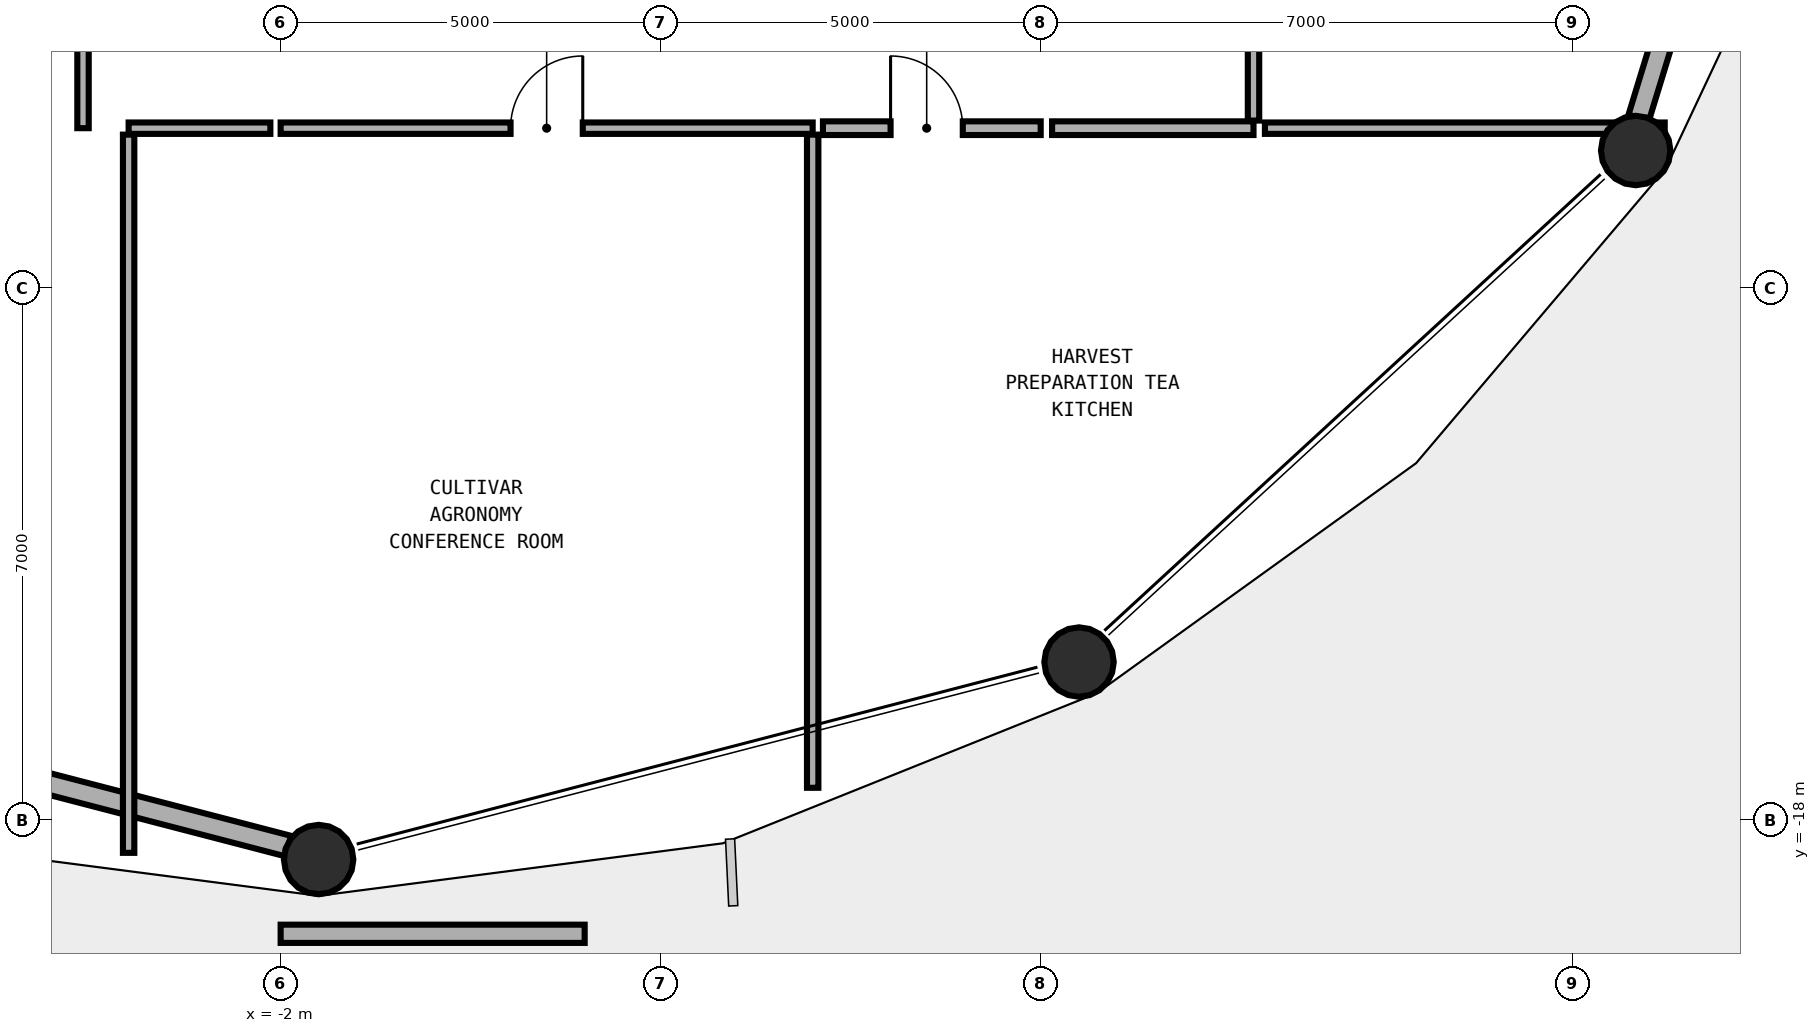
"""IFC4 building model, lengths in metres.
Left out: names, types, materials, properties, quantities, classifications, styles, units other than length and angle.
Written with IfcOpenShell. Run it as: python <this file> out.ifc"""

import sys

from ifc_helpers import new_model, si_unit, direction, frame, frame_2d, origin, origin_2d, place, context, subcontext, project, spatial, rectangle, hollow_circle, extrude, element, fill, save


model = new_model("IFC4")
c1 = context("Model", 3, precision=1e-05, world=origin(), true_north=direction((0.0, 1.0)))
c2 = subcontext(c1, "Body", "Model", "MODEL_VIEW")
j1 = project(units=[si_unit("LENGTHUNIT", "METRE"), si_unit("PLANEANGLEUNIT", "RADIAN")], contexts=[c1])
p1 = place(None, origin())
s1 = spatial("IfcSite", under=j1, at=p1, CompositionType="ELEMENT")
p2 = place(p1, origin())
s2 = spatial("IfcBuilding", under=s1, at=p2, CompositionType="ELEMENT")
p3 = place(p2, frame((0.0, 0.0, 27.6)))
s3 = spatial("IfcBuildingStorey", under=s2, at=p3, CompositionType="ELEMENT", Elevation=27.6)
p4 = place(p3, frame((-1.5, -18.45, 0.0), z_axis=(0.0, -0.037649698668, 0.999290998754), x_axis=(1.0, 0.0, 0.0)))
e1 = element("IfcColumn", 1, at=p4, inside=s3, PredefinedType="COLUMN", context=c2, shape_type="SweptSolid", body=[
    extrude(hollow_circle(Radius=0.457, WallThickness=0.032, at=origin_2d()), origin(), (0.0, 0.0, 1.0), 3.878),
])
p5 = place(p3, frame((8.458, -15.861, 0.0), z_axis=(0.024236523215, -0.032609140326, 0.999174276545), x_axis=(0.802595483818, 0.596523670406, 0.0)))
e2 = element("IfcColumn", 2, at=p5, inside=s3, PredefinedType="COLUMN", context=c2, shape_type="SweptSolid", body=[
    extrude(hollow_circle(Radius=0.457, WallThickness=0.032, at=origin_2d()), origin(), (0.0, 0.0, 1.0), 3.878),
])
p6 = place(p3, frame((15.747, -9.157, 0.0), z_axis=(0.041979196917, -0.018818260687, 0.998941249569), x_axis=(0.409055904093, 0.912509324515, 0.0)))
e3 = element("IfcColumn", 3, at=p6, inside=s3, PredefinedType="COLUMN", context=c2, shape_type="SweptSolid", body=[
    extrude(hollow_circle(Radius=0.457, WallThickness=0.032, at=origin_2d()), origin(), (0.0, 0.0, 1.0), 3.879),
])
p7 = place(p3, frame((-2.0, -19.5, 0.0), z_axis=(0.0, 0.0, 1.0), x_axis=(1.0, 0.0, 0.0)))
e4 = element("IfcWall", 4, at=p7, inside=s3, PredefinedType="PARAPET", context=c2, shape_type="SweptSolid", body=[
    extrude(rectangle(XDim=4.0, YDim=0.24, at=frame_2d((2.0, 0.0))), origin(), (0.0, 0.0, 1.0), 0.55),
])
p8 = place(p3, frame((-1.899, -18.346, 0.0), z_axis=(0.0, 0.0, 1.0), x_axis=(-0.967836325918, 0.251580695274, 0.0)))
e5 = element("IfcWall", 5, at=p8, inside=s3, PredefinedType="SOLIDWALL", context=c2, shape_type="SweptSolid", body=[
    extrude(rectangle(XDim=9.465, YDim=0.28, at=frame_2d((4.732, 0.0))), origin(), (0.0, 0.0, 1.0), 3.06),
])
p9 = place(p3, frame((18.429, -0.394, 0.0), z_axis=(0.0, 0.0, 1.0), x_axis=(-0.292709587844, -0.956201389449, 0.0)))
e6 = element("IfcWall", 6, at=p9, inside=s3, PredefinedType="SOLIDWALL", context=c2, shape_type="SweptSolid", body=[
    extrude(rectangle(XDim=8.753, YDim=0.28, at=frame_2d((4.376, 0.0))), origin(), (0.0, 0.0, 1.0), 3.06),
])
p10 = place(p3, frame((-2.0, -8.9, 0.0), z_axis=(0.0, 0.0, 1.0), x_axis=(1.0, 0.0, 0.0)))
e7 = element("IfcWall", 7, at=p10, inside=s3, PredefinedType="PARTITIONING", context=c2, shape_type="SweptSolid", body=[
    extrude(rectangle(XDim=7.0, YDim=0.15, at=frame_2d((3.5, 0.0))), origin(), (0.0, 0.0, 1.0), 3.64),
])
p11 = place(p10, frame((3.025, 0.0, 0.0)))
e8 = element("IfcOpeningElement", 8, at=p11, cuts=e7, PredefinedType="OPENING", context=c2, shape_type="SweptSolid", body=[
    extrude(rectangle(XDim=0.95, YDim=2.1, at=frame_2d((0.475, 1.05))), frame((0.0, 0.085, 0.0), z_axis=(0.0, -1.0, 0.0), x_axis=(1.0, 0.0, 0.0)), (0.0, 0.0, 1.0), 0.17),
])
p12 = place(p3, frame((5.135, -8.9, 0.0), z_axis=(0.0, 0.0, 1.0), x_axis=(1.0, 0.0, 0.0)))
e9 = element("IfcWall", 9, at=p12, inside=s3, PredefinedType="PLUMBINGWALL", context=c2, shape_type="SweptSolid", body=[
    extrude(rectangle(XDim=2.865, YDim=0.18, at=frame_2d((1.433, 0.0))), origin(), (0.0, 0.0, 1.0), 3.64),
])
p13 = place(p12, frame((0.89, 0.0, 0.0)))
e10 = element("IfcOpeningElement", 10, at=p13, cuts=e9, PredefinedType="OPENING", context=c2, shape_type="SweptSolid", body=[
    extrude(rectangle(XDim=0.95, YDim=2.1, at=frame_2d((0.475, 1.05))), frame((0.0, 0.1, 0.0), z_axis=(0.0, -1.0, 0.0), x_axis=(1.0, 0.0, 0.0)), (0.0, 0.0, 1.0), 0.2),
])
p14 = place(p3, frame((-4.0, -8.9, 0.0), z_axis=(0.0, 0.0, 1.0), x_axis=(1.0, 0.0, 0.0)))
e11 = element("IfcWall", 11, at=p14, inside=s3, PredefinedType="PARTITIONING", context=c2, shape_type="SweptSolid", body=[
    extrude(rectangle(XDim=1.865, YDim=0.15, at=frame_2d((0.933, 0.0))), origin(), (0.0, 0.0, 1.0), 3.64),
])
p15 = place(p3, frame((5.0, -8.985, 0.0), z_axis=(0.0, 0.0, 1.0), x_axis=(0.0, -1.0, 0.0)))
e12 = element("IfcWall", 12, at=p15, inside=s3, PredefinedType="PARTITIONING", context=c2, shape_type="SweptSolid", body=[
    extrude(rectangle(XDim=8.594, YDim=0.15, at=frame_2d((4.297, 0.0))), origin(), (0.0, 0.0, 1.0), 3.64),
])
p16 = place(p3, frame((-4.0, -18.435, 0.0), z_axis=(0.0, 0.0, 1.0), x_axis=(0.0, 1.0, 0.0)))
e13 = element("IfcWall", 13, at=p16, inside=s3, PredefinedType="PARTITIONING", context=c2, shape_type="SweptSolid", body=[
    extrude(rectangle(XDim=9.45, YDim=0.15, at=frame_2d((4.725, 0.0))), origin(), (0.0, 0.0, 1.0), 3.64),
])
p17 = place(p3, frame((8.15, -8.9, 0.0), z_axis=(0.0, 0.0, 1.0), x_axis=(1.0, 0.0, 0.0)))
e14 = element("IfcWall", 14, at=p17, inside=s3, PredefinedType="PLUMBINGWALL", context=c2, shape_type="SweptSolid", body=[
    extrude(rectangle(XDim=2.65, YDim=0.18, at=frame_2d((1.325, 0.0))), origin(), (0.0, 0.0, 1.0), 3.64),
])
p18 = place(p3, frame((10.95, -8.9, 0.0), z_axis=(0.0, 0.0, 1.0), x_axis=(1.0, 0.0, 0.0)))
e15 = element("IfcWall", 15, at=p18, inside=s3, PredefinedType="PARTITIONING", context=c2, shape_type="SweptSolid", body=[
    extrude(rectangle(XDim=5.26, YDim=0.15, at=frame_2d((2.63, 0.0))), origin(), (0.0, 0.0, 1.0), 2.972),
])
p19 = place(p3, frame((-4.6, -6.735, 0.0), z_axis=(0.0, 0.0, 1.0), x_axis=(0.0, -1.0, 0.0)))
e16 = element("IfcWall", 16, at=p19, inside=s3, PredefinedType="PARTITIONING", context=c2, shape_type="SweptSolid", body=[
    extrude(rectangle(XDim=2.165, YDim=0.15, at=frame_2d((1.083, 0.0))), origin(), (0.0, 0.0, 1.0), 3.64),
])
p20 = place(p3, frame((10.8, -8.8, 0.0), z_axis=(0.0, 0.0, 1.0), x_axis=(0.0, 1.0, 0.0)))
e17 = element("IfcWall", 17, at=p20, inside=s3, PredefinedType="PARTITIONING", context=c2, shape_type="SweptSolid", body=[
    extrude(rectangle(XDim=2.2, YDim=0.15, at=frame_2d((1.1, 0.0))), origin(), (0.0, 0.0, 1.0), 3.64),
])
p21 = place(p11, origin())
e18 = element("IfcDoor", 18, at=p21, inside=s3, OperationType="SINGLE_SWING_RIGHT", PredefinedType="DOOR", context=c2, shape_type="SweptSolid", body=[
    extrude(rectangle(XDim=0.95, YDim=2.1, at=frame_2d((0.475, 1.05))), frame((0.0, 0.025, 0.0), z_axis=(0.0, -1.0, 0.0), x_axis=(1.0, 0.0, 0.0)), (0.0, 0.0, 1.0), 0.05),
])
fill(e8, e18)
p22 = place(p13, origin())
e19 = element("IfcDoor", 19, at=p22, inside=s3, OperationType="SINGLE_SWING_LEFT", PredefinedType="DOOR", context=c2, shape_type="SweptSolid", body=[
    extrude(rectangle(XDim=0.95, YDim=2.1, at=frame_2d((0.475, 1.05))), frame((0.0, 0.025, 0.0), z_axis=(0.0, -1.0, 0.0), x_axis=(1.0, 0.0, 0.0)), (0.0, 0.0, 1.0), 0.05),
])
fill(e10, e19)
save(model, sys.argv[1])
